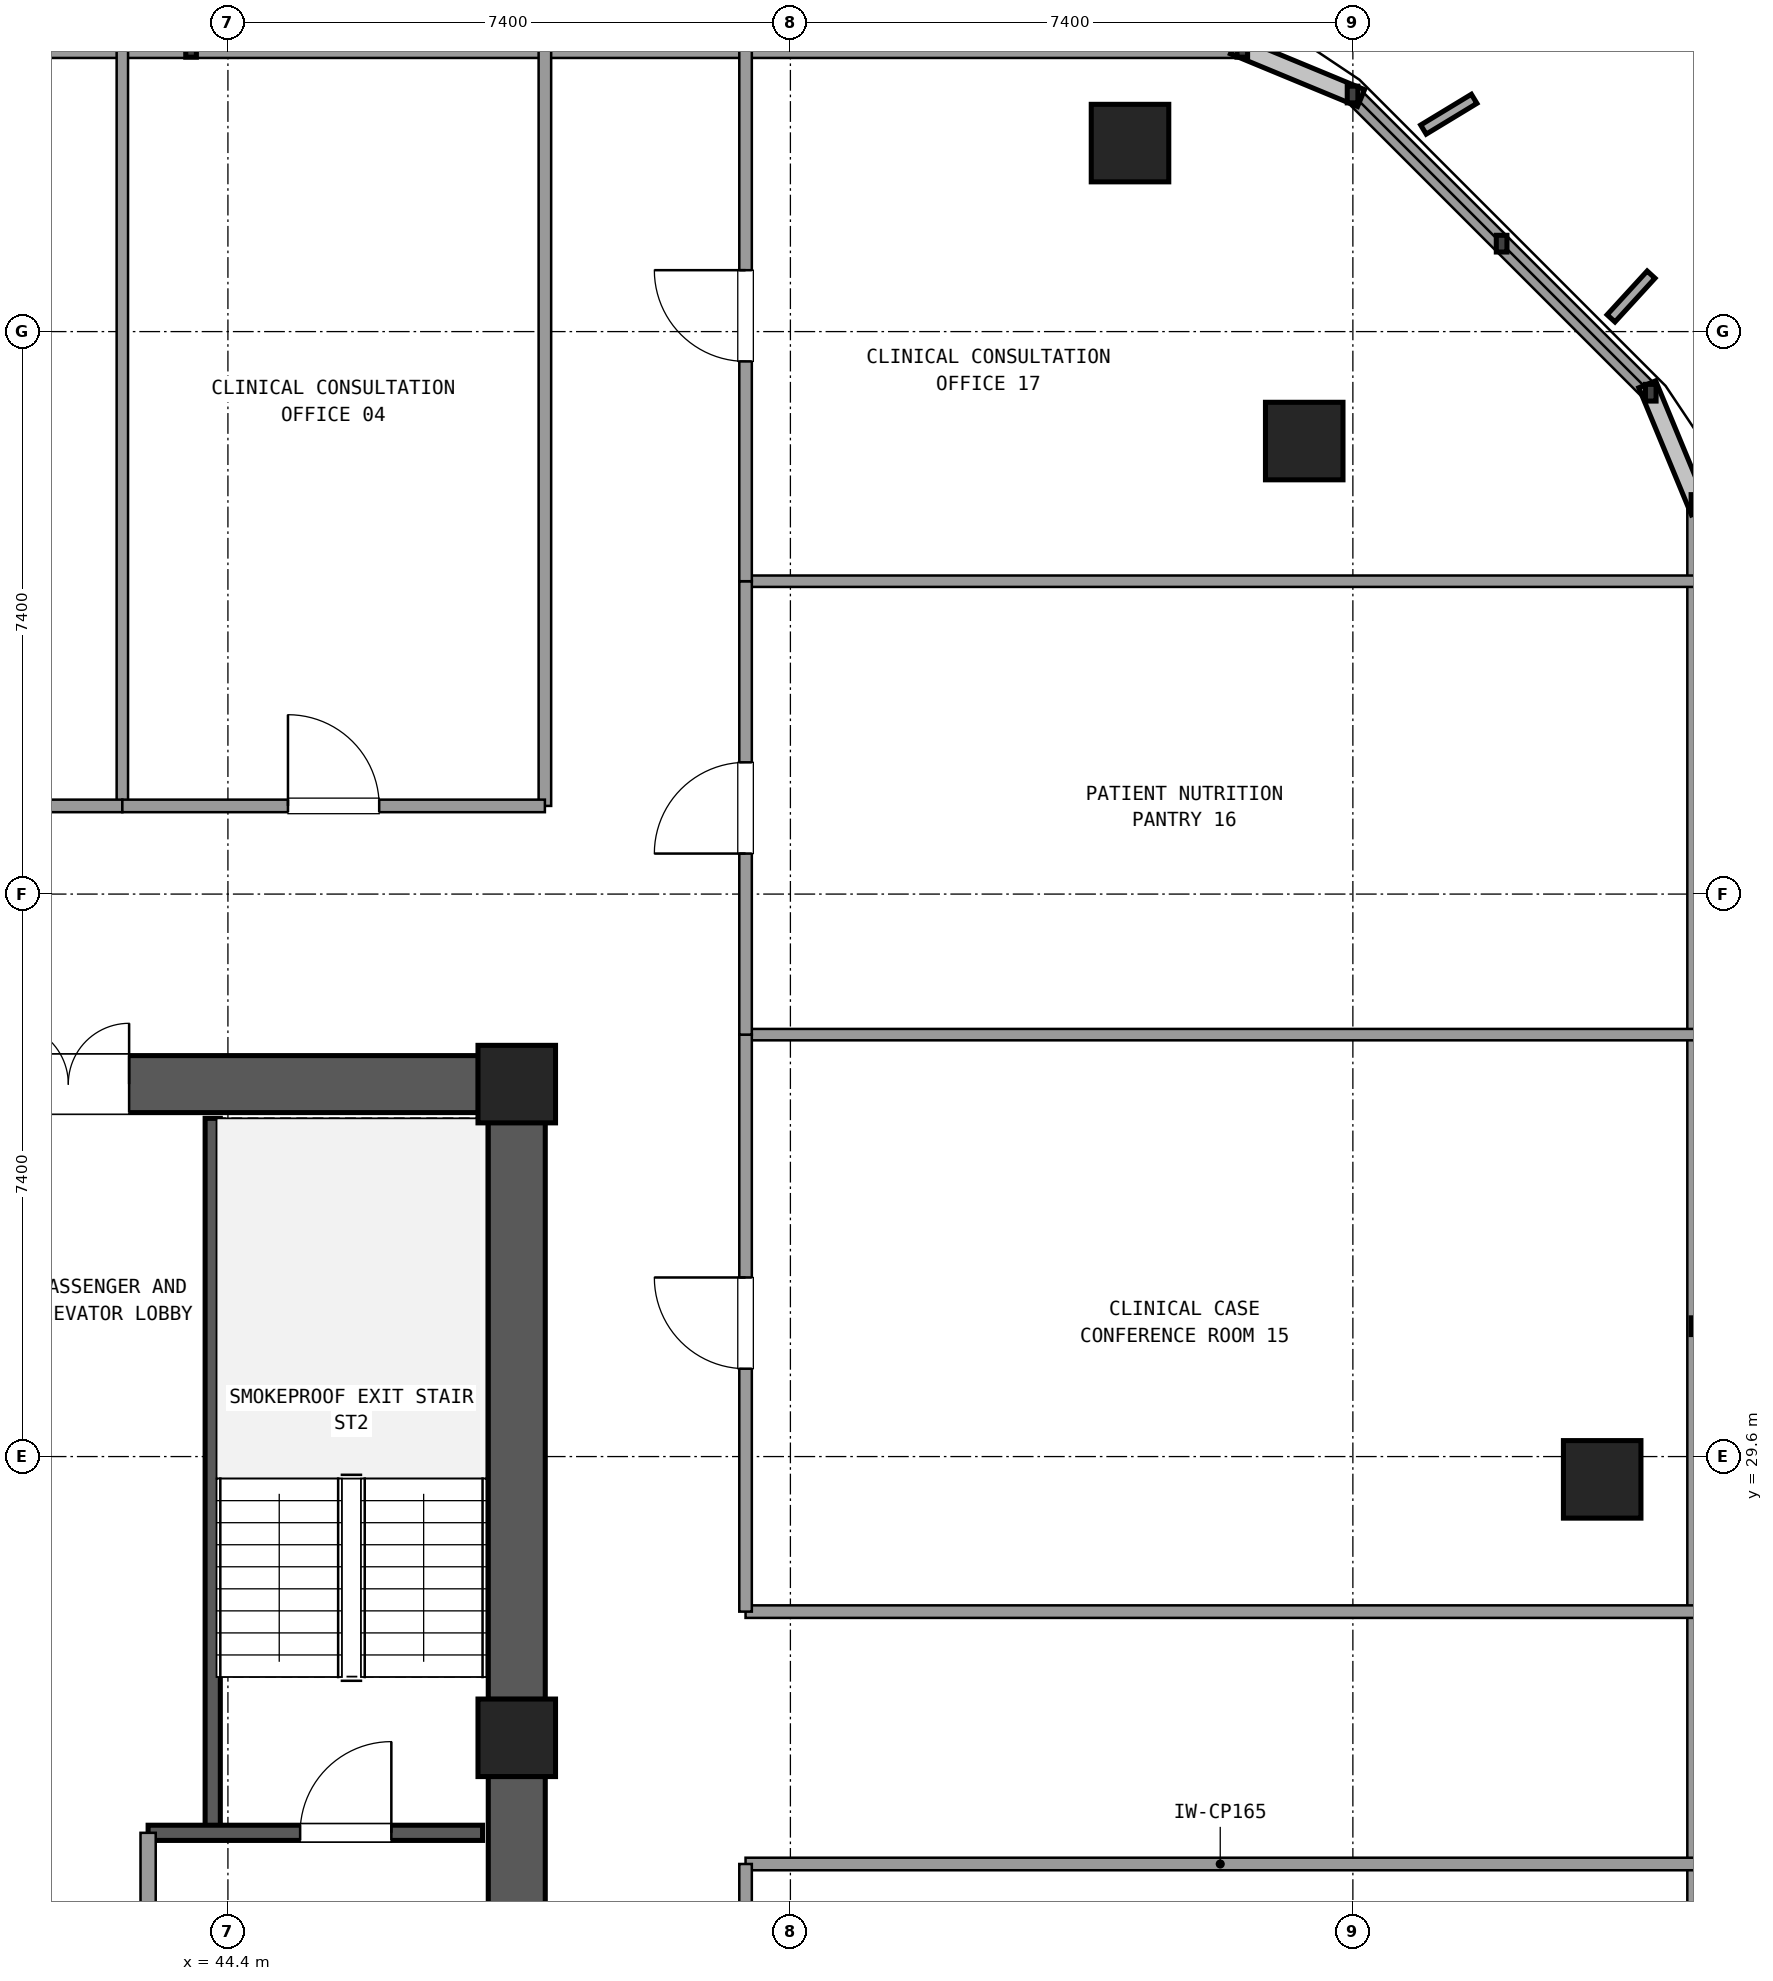
"""IFC4 building model, lengths in metres.
Left out: names, types, materials, properties, quantities, classifications, styles, units other than length and angle.
Written with IfcOpenShell. Run it as: python <this file> out.ifc"""

import sys

from ifc_helpers import new_model, si_unit, direction, frame, frame_2d, origin, origin_2d, place, context, subcontext, project, spatial, rectangle, extrude, element, fill, save


model = new_model("IFC4")
c1 = context("Model", 3, precision=1e-05, world=origin(), true_north=direction((0.0, 1.0)))
c2 = subcontext(c1, "Body", "Model", "MODEL_VIEW")
j1 = project(units=[si_unit("LENGTHUNIT", "METRE"), si_unit("PLANEANGLEUNIT", "RADIAN")], contexts=[c1])
p1 = place(None, origin())
s1 = spatial("IfcSite", under=j1, at=p1, CompositionType="ELEMENT")
p2 = place(p1, origin())
s2 = spatial("IfcBuilding", under=s1, at=p2, CompositionType="ELEMENT")
p3 = place(p2, frame((0.0, 0.0, 84.78)))
s3 = spatial("IfcBuildingStorey", under=s2, at=p3, CompositionType="ELEMENT", Elevation=84.78)
for number, where, z_axis, x_axis in (
    (1, (48.2, 25.9, 0.0), (0.0, 0.0, 1.0), (1.0, 0.0, 0.0)),
    (2, (48.2, 34.5, 0.0), (0.0, 0.0, 1.0), (1.0, 0.0, 0.0)),
):
    element("IfcColumn", number, at=place(p3, frame(where, z_axis=z_axis, x_axis=x_axis)), inside=s3, PredefinedType="COLUMN", context=c2, shape_type="SweptSolid", body=[
        extrude(rectangle(XDim=1.02, YDim=1.02, at=origin_2d()), origin(), (0.0, 0.0, 1.0), 3.6),
    ])
p4 = place(p3, frame((48.2, 17.805, 0.0), z_axis=(0.0, 0.0, 1.0), x_axis=(0.0, 1.0, 0.0)))
e3 = element("IfcWall", 3, at=p4, inside=s3, PredefinedType="SHEAR", context=c2, shape_type="SweptSolid", body=[
    extrude(rectangle(XDim=7.59, YDim=0.75, at=frame_2d((3.795, 0.0))), origin(), (0.0, 0.0, 1.0), 3.32),
])
p5 = place(p4, frame((4.245, 0.0, 0.0)))
e4 = element("IfcOpeningElement", 4, at=p5, cuts=e3, PredefinedType="OPENING", context=c2, shape_type="SweptSolid", body=[
    extrude(rectangle(XDim=1.2, YDim=2.15, at=frame_2d((0.6, 1.075))), frame((0.0, 0.385, 0.0), z_axis=(0.0, -1.0, 0.0), x_axis=(1.0, 0.0, 0.0)), (0.0, 0.0, 1.0), 0.77),
])
p6 = place(p3, frame((48.2, 26.405, 0.0), z_axis=(0.0, 0.0, 1.0), x_axis=(0.0, 1.0, 0.0)))
e5 = element("IfcWall", 5, at=p6, inside=s3, PredefinedType="SHEAR", context=c2, shape_type="SweptSolid", body=[
    extrude(rectangle(XDim=7.59, YDim=0.75, at=frame_2d((3.795, 0.0))), origin(), (0.0, 0.0, 1.0), 3.32),
])
p7 = place(p3, frame((47.695, 34.5, 0.0), z_axis=(0.0, 0.0, 1.0), x_axis=(-1.0, 0.0, 0.0)))
e6 = element("IfcWall", 6, at=p7, inside=s3, PredefinedType="SHEAR", context=c2, shape_type="SweptSolid", body=[
    extrude(rectangle(XDim=10.19, YDim=0.75, at=frame_2d((5.095, 0.0))), origin(), (0.0, 0.0, 1.0), 3.32),
])
p8 = place(p7, frame((4.595, 0.0, 0.0)))
e7 = element("IfcOpeningElement", 7, at=p8, cuts=e6, PredefinedType="OPENING", context=c2, shape_type="SweptSolid", body=[
    extrude(rectangle(XDim=1.6, YDim=2.2, at=frame_2d((0.8, 1.1))), frame((0.0, 0.385, 0.0), z_axis=(0.0, -1.0, 0.0), x_axis=(1.0, 0.0, 0.0)), (0.0, 0.0, 1.0), 0.77),
])
p9 = place(p3, frame((62.48, 29.3, 0.0), z_axis=(0.0, 0.0, 1.0), x_axis=(1.0, 0.0, 0.0)))
e8 = element("IfcColumn", 8, at=p9, inside=s3, PredefinedType="COLUMN", context=c2, shape_type="SweptSolid", body=[
    extrude(rectangle(XDim=1.02, YDim=1.02, at=origin_2d()), origin(), (0.0, 0.0, 1.0), 3.578),
])
for number, where, z_axis, x_axis in (
    (9, (58.56, 42.96, 0.0), (0.0, 0.0, 1.0), (1.0, 0.0, 0.0)),
    (10, (56.268, 46.88, 0.0), (0.0, 0.0, 1.0), (1.0, 0.0, 0.0)),
):
    element("IfcColumn", number, at=place(p3, frame(where, z_axis=z_axis, x_axis=x_axis)), inside=s3, PredefinedType="COLUMN", context=c2, shape_type="SweptSolid", body=[
        extrude(rectangle(XDim=1.02, YDim=1.02, at=origin_2d()), origin(), (0.0, 0.0, 1.0), 3.577),
    ])
p10 = place(p3, frame((63.72, 9.655, 0.0), z_axis=(0.0, 0.0, 1.0), x_axis=(0.0, 1.0, 0.0)))
e11 = element("IfcWall", 11, at=p10, inside=s3, PredefinedType="SOLIDWALL", context=c2, shape_type="SweptSolid", body=[
    extrude(rectangle(XDim=32.49, YDim=0.24, at=frame_2d((16.245, 0.0))), origin(), (0.0, 0.0, 1.0), 0.85),
])
p11 = place(p3, frame((63.119, 43.596, 0.0), z_axis=(0.0, 0.0, 1.0), x_axis=(-0.707084777957, 0.707128783731, 0.0)))
e12 = element("IfcWall", 12, at=p11, inside=s3, PredefinedType="SOLIDWALL", context=c2, shape_type="SweptSolid", body=[
    extrude(rectangle(XDim=5.548, YDim=0.24, at=frame_2d((2.774, 0.0))), origin(), (0.0, 0.0, 1.0), 0.85),
])
p12 = place(p3, frame((57.745, 48.12, 0.0), z_axis=(0.0, 0.0, 1.0), x_axis=(-1.0, 0.0, 0.0)))
e13 = element("IfcWall", 13, at=p12, inside=s3, PredefinedType="SOLIDWALL", context=c2, shape_type="SweptSolid", body=[
    extrude(rectangle(XDim=41.49, YDim=0.24, at=frame_2d((20.745, 0.0))), origin(), (0.0, 0.0, 1.0), 0.85),
])
p13 = place(p3, frame((44.2, 24.65, 0.0), z_axis=(0.0, 0.0, 1.0), x_axis=(0.0, 1.0, 0.0)))
e14 = element("IfcWall", 14, at=p13, inside=s3, PredefinedType="SHEAR", context=c2, shape_type="SweptSolid", body=[
    extrude(rectangle(XDim=9.4, YDim=0.2, at=frame_2d((4.7, 0.0))), origin(), (0.0, 0.0, 1.0), 3.32),
])
p14 = place(p3, frame((43.35, 24.65, 0.0), z_axis=(0.0, 0.0, 1.0), x_axis=(1.0, 0.0, 0.0)))
e15 = element("IfcWall", 15, at=p14, inside=s3, PredefinedType="SHEAR", context=c2, shape_type="SweptSolid", body=[
    extrude(rectangle(XDim=4.4, YDim=0.2, at=frame_2d((2.2, 0.0))), origin(), (0.0, 0.0, 1.0), 3.32),
])
p15 = place(p14, frame((2.0, 0.0, 0.0)))
e16 = element("IfcOpeningElement", 16, at=p15, cuts=e15, PredefinedType="OPENING", context=c2, shape_type="SweptSolid", body=[
    extrude(rectangle(XDim=1.2, YDim=2.15, at=frame_2d((0.6, 1.075))), frame((0.0, 0.11, 0.0), z_axis=(0.0, -1.0, 0.0), x_axis=(1.0, 0.0, 0.0)), (0.0, 0.0, 1.0), 0.22),
])
p16 = place(p3, frame((43.35, 17.75, 0.0), z_axis=(0.0, 0.0, 1.0), x_axis=(0.0, 1.0, 0.0)))
e17 = element("IfcWall", 17, at=p16, inside=s3, PredefinedType="SOLIDWALL", context=c2, shape_type="SweptSolid", body=[
    extrude(rectangle(XDim=6.9, YDim=0.2, at=frame_2d((3.45, 0.0))), origin(), (0.0, 0.0, 1.0), 2.61),
])
p17 = place(p16, frame((4.15, 0.0, 0.0)))
e18 = element("IfcOpeningElement", 18, at=p17, cuts=e17, PredefinedType="OPENING", context=c2, shape_type="SweptSolid", body=[
    extrude(rectangle(XDim=1.2, YDim=2.15, at=frame_2d((0.6, 1.075))), frame((0.0, 0.11, 0.0), z_axis=(0.0, -1.0, 0.0), x_axis=(1.0, 0.0, 0.0)), (0.0, 0.0, 1.0), 0.22),
])
p18 = place(p3, frame((48.57, 38.16, 0.0), z_axis=(0.0, 0.0, 1.0), x_axis=(0.0, 1.0, 0.0)))
e19 = element("IfcWall", 19, at=p18, inside=s3, PredefinedType="PARTITIONING", context=c2, shape_type="SweptSolid", body=[
    extrude(rectangle(XDim=9.94, YDim=0.165, at=frame_2d((4.97, 0.0))), origin(), (0.0, 0.0, 1.0), 2.61),
])
for number, where, z_axis, x_axis in (
    (20, (51.21, 24.24, 0.0), (0.0, 0.0, 1.0), (1.0, 0.0, 0.0)),
    (21, (51.21, 27.56, 0.0), (0.0, 0.0, 1.0), (1.0, 0.0, 0.0)),
):
    element("IfcWall", number, at=place(p3, frame(where, z_axis=z_axis, x_axis=x_axis)), inside=s3, PredefinedType="PARTITIONING", context=c2, shape_type="SweptSolid", body=[
        extrude(rectangle(XDim=12.49, YDim=0.165, at=frame_2d((6.245, 0.0))), origin(), (0.0, 0.0, 1.0), 2.61),
    ])
p19 = place(p3, frame((43.011, 38.16, 0.0), z_axis=(0.0, 0.0, 1.0), x_axis=(0.0, 1.0, 0.0)))
e22 = element("IfcWall", 22, at=p19, inside=s3, PredefinedType="PARTITIONING", context=c2, shape_type="SweptSolid", body=[
    extrude(rectangle(XDim=9.94, YDim=0.15, at=frame_2d((4.97, 0.0))), origin(), (0.0, 0.0, 1.0), 2.61),
])
p20 = place(p3, frame((37.462, 38.16, 0.0), z_axis=(0.0, 0.0, 1.0), x_axis=(1.0, 0.0, 0.0)))
e23 = element("IfcWall", 23, at=p20, inside=s3, PredefinedType="PARTITIONING", context=c2, shape_type="SweptSolid", body=[
    extrude(rectangle(XDim=5.549, YDim=0.165, at=frame_2d((2.774, 0.0))), origin(), (0.0, 0.0, 1.0), 2.61),
])
p21 = place(p20, frame((2.174, 0.0, 0.0)))
e24 = element("IfcOpeningElement", 24, at=p21, cuts=e23, PredefinedType="OPENING", context=c2, shape_type="SweptSolid", body=[
    extrude(rectangle(XDim=1.2, YDim=2.15, at=frame_2d((0.6, 1.075))), frame((0.0, 0.093, 0.0), z_axis=(0.0, -1.0, 0.0), x_axis=(1.0, 0.0, 0.0)), (0.0, 0.0, 1.0), 0.185),
])
p22 = place(p3, frame((43.011, 38.16, 0.0), z_axis=(0.0, 0.0, 1.0), x_axis=(1.0, 0.0, 0.0)))
e25 = element("IfcWall", 25, at=p22, inside=s3, PredefinedType="PARTITIONING", context=c2, shape_type="SweptSolid", body=[
    extrude(rectangle(XDim=5.559, YDim=0.165, at=frame_2d((2.78, 0.0))), origin(), (0.0, 0.0, 1.0), 2.61),
])
p23 = place(p22, frame((2.179, 0.0, 0.0)))
e26 = element("IfcOpeningElement", 26, at=p23, cuts=e25, PredefinedType="OPENING", context=c2, shape_type="SweptSolid", body=[
    extrude(rectangle(XDim=1.2, YDim=2.15, at=frame_2d((0.6, 1.075))), frame((0.0, 0.093, 0.0), z_axis=(0.0, -1.0, 0.0), x_axis=(1.0, 0.0, 0.0)), (0.0, 0.0, 1.0), 0.185),
])
p24 = place(p3, frame((51.21, 15.613, 0.0), z_axis=(0.0, 0.0, 1.0), x_axis=(0.0, 1.0, 0.0)))
e27 = element("IfcWall", 27, at=p24, inside=s3, PredefinedType="PARTITIONING", context=c2, shape_type="SweptSolid", body=[
    extrude(rectangle(XDim=8.627, YDim=0.165, at=frame_2d((4.313, 0.0))), origin(), (0.0, 0.0, 1.0), 2.61),
])
p25 = place(p24, frame((3.713, 0.0, 0.0)))
e28 = element("IfcOpeningElement", 28, at=p25, cuts=e27, PredefinedType="OPENING", context=c2, shape_type="SweptSolid", body=[
    extrude(rectangle(XDim=1.2, YDim=2.15, at=frame_2d((0.6, 1.075))), frame((0.0, 0.093, 0.0), z_axis=(0.0, -1.0, 0.0), x_axis=(1.0, 0.0, 0.0)), (0.0, 0.0, 1.0), 0.185),
])
p26 = place(p3, frame((51.21, 35.151, 0.0), z_axis=(0.0, 0.0, 1.0), x_axis=(1.0, 0.0, 0.0)))
e29 = element("IfcWall", 29, at=p26, inside=s3, PredefinedType="PARTITIONING", context=c2, shape_type="SweptSolid", body=[
    extrude(rectangle(XDim=12.49, YDim=0.15, at=frame_2d((6.245, 0.0))), origin(), (0.0, 0.0, 1.0), 2.61),
])
p27 = place(p3, frame((51.21, 27.56, 0.0), z_axis=(0.0, 0.0, 1.0), x_axis=(0.0, 1.0, 0.0)))
e30 = element("IfcWall", 30, at=p27, inside=s3, PredefinedType="PARTITIONING", context=c2, shape_type="SweptSolid", body=[
    extrude(rectangle(XDim=7.591, YDim=0.165, at=frame_2d((3.795, 0.0))), origin(), (0.0, 0.0, 1.0), 2.61),
])
p28 = place(p27, frame((3.196, 0.0, 0.0)))
e31 = element("IfcOpeningElement", 31, at=p28, cuts=e30, PredefinedType="OPENING", context=c2, shape_type="SweptSolid", body=[
    extrude(rectangle(XDim=1.2, YDim=2.15, at=frame_2d((0.6, 1.075))), frame((0.0, 0.093, 0.0), z_axis=(0.0, -1.0, 0.0), x_axis=(1.0, 0.0, 0.0)), (0.0, 0.0, 1.0), 0.185),
])
p29 = place(p3, frame((51.21, 41.116, 0.0), z_axis=(0.0, 0.0, 1.0), x_axis=(1.0, 0.0, 0.0)))
e32 = element("IfcWall", 32, at=p29, inside=s3, PredefinedType="PARTITIONING", context=c2, shape_type="SweptSolid", body=[
    extrude(rectangle(XDim=12.49, YDim=0.15, at=frame_2d((6.245, 0.0))), origin(), (0.0, 0.0, 1.0), 2.61),
])
p30 = place(p3, frame((51.21, 35.151, 0.0), z_axis=(0.0, 0.0, 1.0), x_axis=(0.0, 1.0, 0.0)))
e33 = element("IfcWall", 33, at=p30, inside=s3, PredefinedType="PARTITIONING", context=c2, shape_type="SweptSolid", body=[
    extrude(rectangle(XDim=5.965, YDim=0.165, at=frame_2d((2.982, 0.0))), origin(), (0.0, 0.0, 1.0), 2.61),
])
p31 = place(p30, frame((2.382, 0.0, 0.0)))
e34 = element("IfcOpeningElement", 34, at=p31, cuts=e33, PredefinedType="OPENING", context=c2, shape_type="SweptSolid", body=[
    extrude(rectangle(XDim=1.2, YDim=2.15, at=frame_2d((0.6, 1.075))), frame((0.0, 0.093, 0.0), z_axis=(0.0, -1.0, 0.0), x_axis=(1.0, 0.0, 0.0)), (0.0, 0.0, 1.0), 0.185),
])
p32 = place(p3, frame((51.21, 41.116, 0.0), z_axis=(0.0, 0.0, 1.0), x_axis=(0.0, 1.0, 0.0)))
e35 = element("IfcWall", 35, at=p32, inside=s3, PredefinedType="PARTITIONING", context=c2, shape_type="SweptSolid", body=[
    extrude(rectangle(XDim=6.984, YDim=0.165, at=frame_2d((3.492, 0.0))), origin(), (0.0, 0.0, 1.0), 2.61),
])
p33 = place(p32, frame((2.892, 0.0, 0.0)))
e36 = element("IfcOpeningElement", 36, at=p33, cuts=e35, PredefinedType="OPENING", context=c2, shape_type="SweptSolid", body=[
    extrude(rectangle(XDim=1.2, YDim=2.15, at=frame_2d((0.6, 1.075))), frame((0.0, 0.093, 0.0), z_axis=(0.0, -1.0, 0.0), x_axis=(1.0, 0.0, 0.0)), (0.0, 0.0, 1.0), 0.185),
])
p34 = place(p15, origin())
e37 = element("IfcDoor", 37, at=p34, inside=s3, OperationType="SINGLE_SWING_RIGHT", PredefinedType="DOOR", context=c2, shape_type="SweptSolid", body=[
    extrude(rectangle(XDim=1.2, YDim=2.15, at=frame_2d((0.6, 1.075))), frame((0.0, 0.025, 0.0), z_axis=(0.0, -1.0, 0.0), x_axis=(1.0, 0.0, 0.0)), (0.0, 0.0, 1.0), 0.05),
])
fill(e16, e37)
p35 = place(p8, frame((1.6, 0.0, 0.0), z_axis=(0.0, 0.0, 1.0), x_axis=(-1.0, 0.0, 0.0)))
e38 = element("IfcDoor", 38, at=p35, inside=s3, OperationType="DOUBLE_DOOR_SINGLE_SWING", PredefinedType="DOOR", context=c2, shape_type="SweptSolid", body=[
    extrude(rectangle(XDim=1.6, YDim=2.2, at=frame_2d((0.8, 1.1))), frame((0.0, 0.025, 0.0), z_axis=(0.0, -1.0, 0.0), x_axis=(1.0, 0.0, 0.0)), (0.0, 0.0, 1.0), 0.05),
])
fill(e7, e38)
p36 = place(p23, origin())
e39 = element("IfcDoor", 39, at=p36, inside=s3, OperationType="SINGLE_SWING_LEFT", PredefinedType="DOOR", context=c2, shape_type="SweptSolid", body=[
    extrude(rectangle(XDim=1.2, YDim=2.15, at=frame_2d((0.6, 1.075))), frame((0.0, 0.025, 0.0), z_axis=(0.0, -1.0, 0.0), x_axis=(1.0, 0.0, 0.0)), (0.0, 0.0, 1.0), 0.05),
])
fill(e26, e39)
p37 = place(p28, origin())
e40 = element("IfcDoor", 40, at=p37, inside=s3, OperationType="SINGLE_SWING_RIGHT", PredefinedType="DOOR", context=c2, shape_type="SweptSolid", body=[
    extrude(rectangle(XDim=1.2, YDim=2.15, at=frame_2d((0.6, 1.075))), frame((0.0, 0.025, 0.0), z_axis=(0.0, -1.0, 0.0), x_axis=(1.0, 0.0, 0.0)), (0.0, 0.0, 1.0), 0.05),
])
fill(e31, e40)
p38 = place(p31, origin())
e41 = element("IfcDoor", 41, at=p38, inside=s3, OperationType="SINGLE_SWING_LEFT", PredefinedType="DOOR", context=c2, shape_type="SweptSolid", body=[
    extrude(rectangle(XDim=1.2, YDim=2.15, at=frame_2d((0.6, 1.075))), frame((0.0, 0.025, 0.0), z_axis=(0.0, -1.0, 0.0), x_axis=(1.0, 0.0, 0.0)), (0.0, 0.0, 1.0), 0.05),
])
fill(e34, e41)
p39 = place(p33, origin())
e42 = element("IfcDoor", 42, at=p39, inside=s3, OperationType="SINGLE_SWING_RIGHT", PredefinedType="DOOR", context=c2, shape_type="SweptSolid", body=[
    extrude(rectangle(XDim=1.2, YDim=2.15, at=frame_2d((0.6, 1.075))), frame((0.0, 0.025, 0.0), z_axis=(0.0, -1.0, 0.0), x_axis=(1.0, 0.0, 0.0)), (0.0, 0.0, 1.0), 0.05),
])
fill(e36, e42)
save(model, sys.argv[1])
